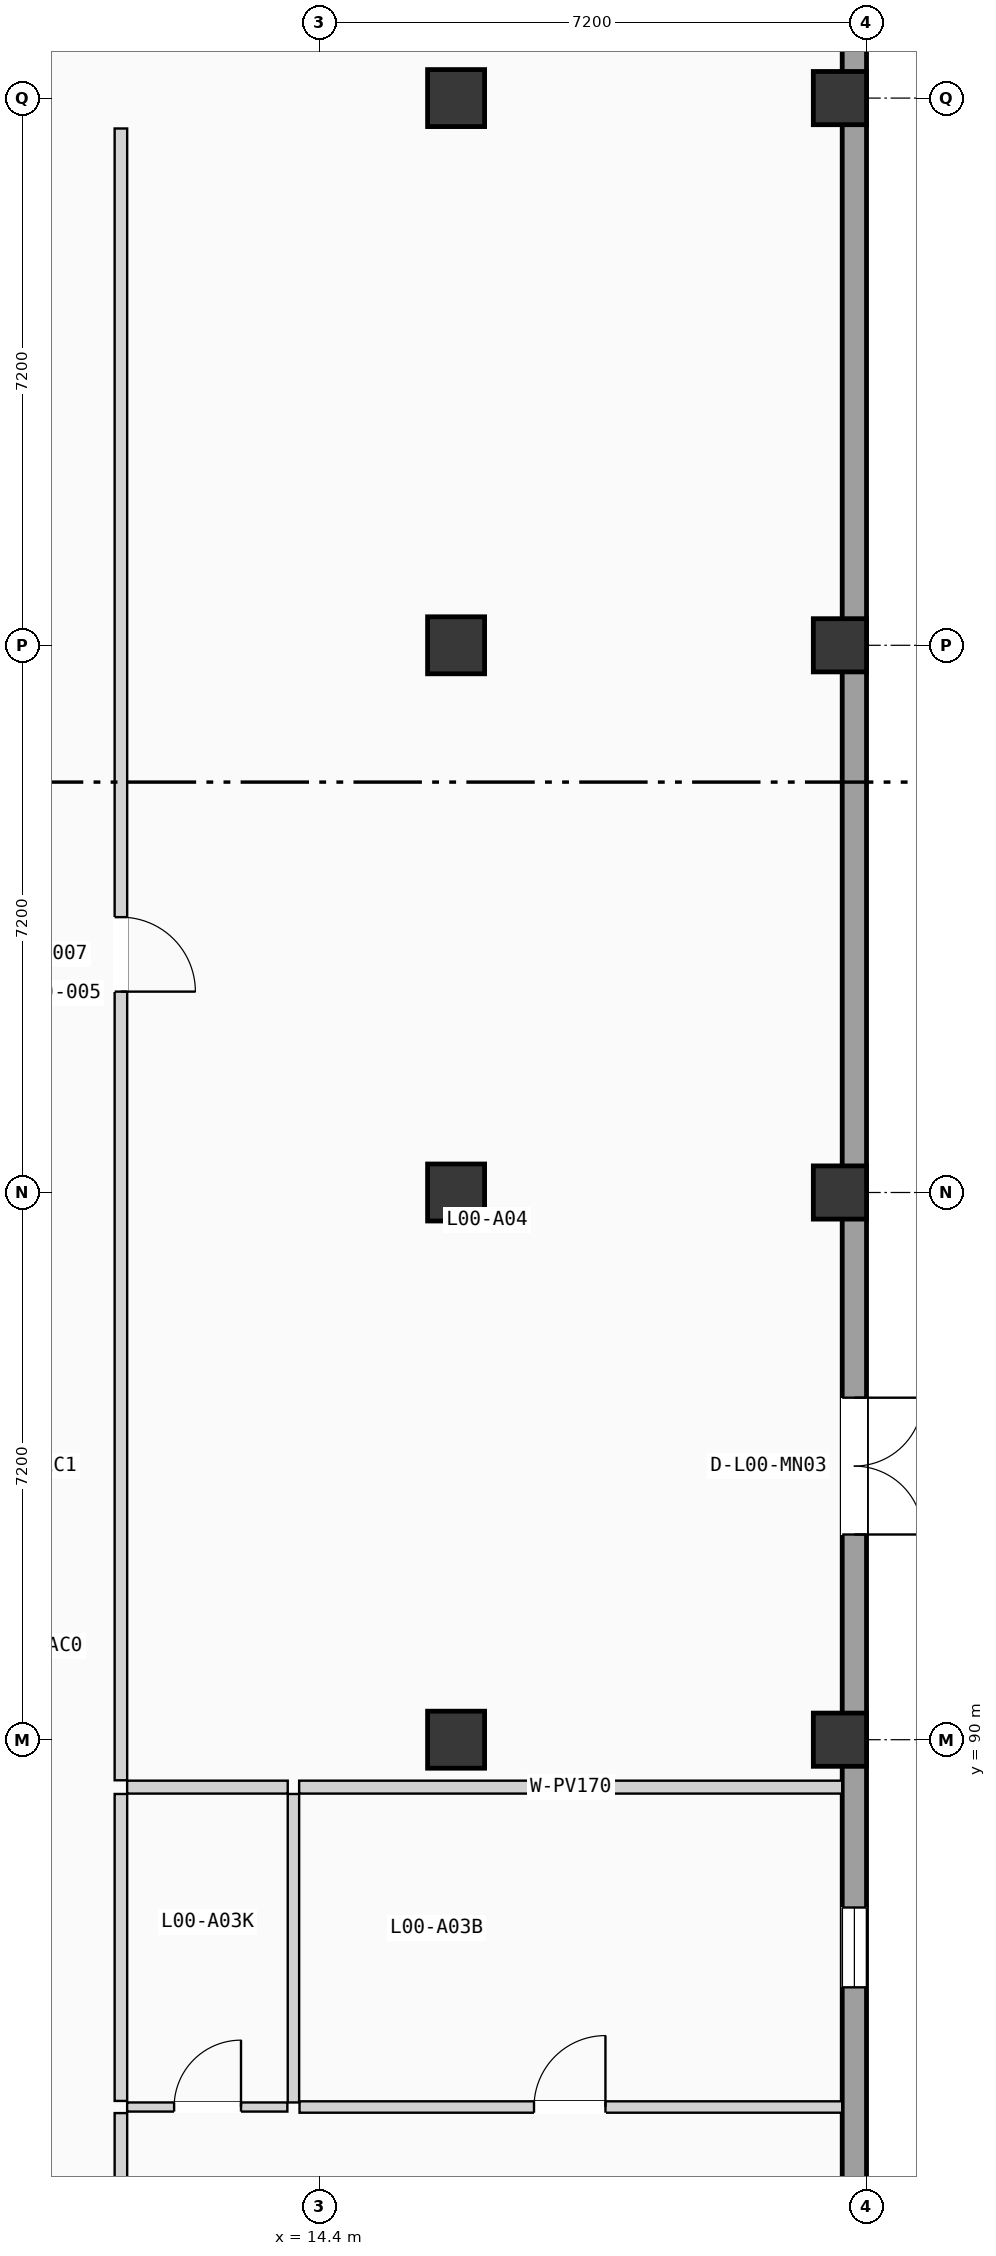
"""IFC4 building model, lengths in metres.
Left out: names, types, materials, properties, quantities, classifications, styles, units other than length and angle.
Written with IfcOpenShell. Run it as: python <this file> out.ifc"""

import sys

from ifc_helpers import new_model, si_unit, direction, frame, frame_2d, origin, origin_2d, place, context, subcontext, project, spatial, rectangle, extrude, element, fill, save


model = new_model("IFC4")
c1 = context("Model", 3, precision=1e-05, world=origin(), true_north=direction((0.0, 1.0)))
c2 = subcontext(c1, "Body", "Model", "MODEL_VIEW")
j1 = project(units=[si_unit("LENGTHUNIT", "METRE"), si_unit("PLANEANGLEUNIT", "RADIAN")], contexts=[c1])
p1 = place(None, origin())
s1 = spatial("IfcSite", under=j1, at=p1, CompositionType="ELEMENT")
p2 = place(p1, origin())
s2 = spatial("IfcBuilding", under=s1, at=p2, CompositionType="ELEMENT")
p3 = place(p2, origin())
s3 = spatial("IfcBuildingStorey", under=s2, at=p3, CompositionType="ELEMENT", Elevation=0.0)
for number, where, z_axis, x_axis in (
    (1, (16.2, 90.0, 0.0), (0.0, 0.0, 1.0), (1.0, 0.0, 0.0)),
    (2, (16.2, 97.2, 0.0), (0.0, 0.0, 1.0), (1.0, 0.0, 0.0)),
    (3, (16.2, 104.4, 0.0), (0.0, 0.0, 1.0), (1.0, 0.0, 0.0)),
    (4, (16.2, 111.6, 0.0), (0.0, 0.0, 1.0), (1.0, 0.0, 0.0)),
):
    element("IfcColumn", number, at=place(p3, frame(where, z_axis=z_axis, x_axis=x_axis)), inside=s3, PredefinedType="COLUMN", context=c2, shape_type="SweptSolid", body=[
        extrude(rectangle(XDim=0.75, YDim=0.75, at=origin_2d()), origin(), (0.0, 0.0, 1.0), 4.9),
    ])
for number, where, z_axis, x_axis in (
    (5, (21.25, 90.0, 0.0), (0.0, 0.0, 1.0), (1.0, 0.0, 0.0)),
    (6, (21.25, 97.2, 0.0), (0.0, 0.0, 1.0), (1.0, 0.0, 0.0)),
    (7, (21.25, 104.4, 0.0), (0.0, 0.0, 1.0), (1.0, 0.0, 0.0)),
    (8, (21.25, 111.6, 0.0), (0.0, 0.0, 1.0), (1.0, 0.0, 0.0)),
):
    element("IfcColumn", number, at=place(p3, frame(where, z_axis=z_axis, x_axis=x_axis)), inside=s3, PredefinedType="COLUMN", context=c2, shape_type="SweptSolid", body=[
        extrude(rectangle(XDim=0.7, YDim=0.7, at=origin_2d()), origin(), (0.0, 0.0, 1.0), 4.9),
    ])
p4 = place(p3, frame((21.44, 68.72, 0.0), z_axis=(0.0, 0.0, 1.0), x_axis=(0.0, 1.0, 0.0)))
e9 = element("IfcWall", 9, at=p4, inside=s3, PredefinedType="SOLIDWALL", context=c2, shape_type="SweptSolid", body=[
    extrude(rectangle(XDim=49.76, YDim=0.32, at=frame_2d((24.88, 0.0))), origin(), (0.0, 0.0, 1.0), 4.64),
])
p5 = place(p4, frame((23.98, 0.0, 0.0)))
e10 = element("IfcOpeningElement", 10, at=p5, cuts=e9, PredefinedType="OPENING", context=c2, shape_type="SweptSolid", body=[
    extrude(rectangle(XDim=1.8, YDim=2.35, at=frame_2d((0.9, 1.175))), frame((0.0, 0.17, 0.0), z_axis=(0.0, -1.0, 0.0), x_axis=(1.0, 0.0, 0.0)), (0.0, 0.0, 1.0), 0.34),
])
p6 = place(p4, frame((12.119, 0.0, 0.9)))
e11 = element("IfcOpeningElement", 11, at=p6, cuts=e9, PredefinedType="OPENING", context=c2, shape_type="SweptSolid", body=[
    extrude(rectangle(XDim=1.05, YDim=1.35, at=frame_2d((0.525, 0.675))), frame((0.0, 0.17, 0.0), z_axis=(0.0, -1.0, 0.0), x_axis=(1.0, 0.0, 0.0)), (0.0, 0.0, 1.0), 0.34),
])
p7 = place(p4, frame((8.774, 0.0, 0.9)))
e12 = element("IfcOpeningElement", 12, at=p7, cuts=e9, PredefinedType="OPENING", context=c2, shape_type="SweptSolid", body=[
    extrude(rectangle(XDim=1.05, YDim=1.5, at=frame_2d((0.525, 0.75))), frame((0.0, 0.17, 0.0), z_axis=(0.0, -1.0, 0.0), x_axis=(1.0, 0.0, 0.0)), (0.0, 0.0, 1.0), 0.34),
])
p8 = place(p4, frame((18.022, 0.0, 0.9)))
e13 = element("IfcOpeningElement", 13, at=p8, cuts=e9, PredefinedType="OPENING", context=c2, shape_type="SweptSolid", body=[
    extrude(rectangle(XDim=1.05, YDim=1.65, at=frame_2d((0.525, 0.825))), frame((0.0, 0.17, 0.0), z_axis=(0.0, -1.0, 0.0), x_axis=(1.0, 0.0, 0.0)), (0.0, 0.0, 1.0), 0.34),
])
p9 = place(p3, frame((11.79, 80.199, 0.0), z_axis=(0.0, 0.0, 1.0), x_axis=(0.0, 1.0, 0.0)))
e14 = element("IfcWall", 14, at=p9, inside=s3, PredefinedType="PARTITIONING", context=c2, shape_type="SweptSolid", body=[
    extrude(rectangle(XDim=4.888, YDim=0.165, at=frame_2d((2.444, 0.0))), origin(), (0.0, 0.0, 1.0), 3.84),
])
p10 = place(p9, frame((1.954, 0.0, 0.0)))
e15 = element("IfcOpeningElement", 15, at=p10, cuts=e14, PredefinedType="OPENING", context=c2, shape_type="SweptSolid", body=[
    extrude(rectangle(XDim=0.98, YDim=2.08, at=frame_2d((0.49, 1.04))), frame((0.0, 0.093, 0.0), z_axis=(0.0, -1.0, 0.0), x_axis=(1.0, 0.0, 0.0)), (0.0, 0.0, 1.0), 0.185),
])
p11 = place(p3, frame((11.79, 85.247, 0.0), z_axis=(0.0, 0.0, 1.0), x_axis=(0.0, 1.0, 0.0)))
e16 = element("IfcWall", 16, at=p11, inside=s3, PredefinedType="PARTITIONING", context=c2, shape_type="SweptSolid", body=[
    extrude(rectangle(XDim=4.039, YDim=0.165, at=frame_2d((2.02, 0.0))), origin(), (0.0, 0.0, 1.0), 3.84),
])
p12 = place(p3, frame((11.79, 89.466, 0.0), z_axis=(0.0, 0.0, 1.0), x_axis=(0.0, 1.0, 0.0)))
e17 = element("IfcWall", 17, at=p12, inside=s3, PredefinedType="PARTITIONING", context=c2, shape_type="SweptSolid", body=[
    extrude(rectangle(XDim=21.734, YDim=0.165, at=frame_2d((10.867, 0.0))), origin(), (0.0, 0.0, 1.0), 3.84),
])
p13 = place(p12, frame((10.377, 0.0, 0.0)))
e18 = element("IfcOpeningElement", 18, at=p13, cuts=e17, PredefinedType="OPENING", context=c2, shape_type="SweptSolid", body=[
    extrude(rectangle(XDim=0.98, YDim=2.08, at=frame_2d((0.49, 1.04))), frame((0.0, 0.093, 0.0), z_axis=(0.0, -1.0, 0.0), x_axis=(1.0, 0.0, 0.0)), (0.0, 0.0, 1.0), 0.185),
])
p14 = place(p3, frame((11.872, 85.167, 0.0), z_axis=(0.0, 0.0, 1.0), x_axis=(1.0, 0.0, 0.0)))
e19 = element("IfcWall", 19, at=p14, inside=s3, PredefinedType="PARTITIONING", context=c2, shape_type="SweptSolid", body=[
    extrude(rectangle(XDim=2.108, YDim=0.12, at=frame_2d((1.054, 0.0))), origin(), (0.0, 0.0, 1.0), 3.84),
])
p15 = place(p14, frame((0.618, 0.0, 0.0)))
e20 = element("IfcOpeningElement", 20, at=p15, cuts=e19, PredefinedType="OPENING", context=c2, shape_type="SweptSolid", body=[
    extrude(rectangle(XDim=0.88, YDim=2.02, at=frame_2d((0.44, 1.01))), frame((0.0, 0.07, 0.0), z_axis=(0.0, -1.0, 0.0), x_axis=(1.0, 0.0, 0.0)), (0.0, 0.0, 1.0), 0.14),
])
p16 = place(p3, frame((14.14, 85.167, 0.0), z_axis=(0.0, 0.0, 1.0), x_axis=(1.0, 0.0, 0.0)))
e21 = element("IfcWall", 21, at=p16, inside=s3, PredefinedType="PARTITIONING", context=c2, shape_type="SweptSolid", body=[
    extrude(rectangle(XDim=7.14, YDim=0.15, at=frame_2d((3.57, 0.0))), origin(), (0.0, 0.0, 1.0), 3.84),
])
p17 = place(p16, frame((3.085, 0.0, 0.0)))
e22 = element("IfcOpeningElement", 22, at=p17, cuts=e21, PredefinedType="OPENING", context=c2, shape_type="SweptSolid", body=[
    extrude(rectangle(XDim=0.94, YDim=2.06, at=frame_2d((0.47, 1.03))), frame((0.0, 0.085, 0.0), z_axis=(0.0, -1.0, 0.0), x_axis=(1.0, 0.0, 0.0)), (0.0, 0.0, 1.0), 0.17),
])
p18 = place(p3, frame((14.06, 85.227, 0.0), z_axis=(0.0, 0.0, 1.0), x_axis=(0.0, 1.0, 0.0)))
e23 = element("IfcWall", 23, at=p18, inside=s3, PredefinedType="PARTITIONING", context=c2, shape_type="SweptSolid", body=[
    extrude(rectangle(XDim=4.059, YDim=0.15, at=frame_2d((2.029, 0.0))), origin(), (0.0, 0.0, 1.0), 3.84),
])
p19 = place(p3, frame((11.872, 89.376, 0.0), z_axis=(0.0, 0.0, 1.0), x_axis=(1.0, 0.0, 0.0)))
e24 = element("IfcWall", 24, at=p19, inside=s3, PredefinedType="PARTITIONING", context=c2, shape_type="SweptSolid", body=[
    extrude(rectangle(XDim=2.113, YDim=0.17, at=frame_2d((1.057, 0.0))), origin(), (0.0, 0.0, 1.0), 3.84),
])
p20 = place(p3, frame((14.135, 89.376, 0.0), z_axis=(0.0, 0.0, 1.0), x_axis=(1.0, 0.0, 0.0)))
e25 = element("IfcWall", 25, at=p20, inside=s3, PredefinedType="PARTITIONING", context=c2, shape_type="SweptSolid", body=[
    extrude(rectangle(XDim=7.145, YDim=0.17, at=frame_2d((3.573, 0.0))), origin(), (0.0, 0.0, 1.0), 3.84),
])
p21 = place(p5, frame((1.8, 0.0, 0.0), z_axis=(0.0, 0.0, 1.0), x_axis=(-1.0, 0.0, 0.0)))
e26 = element("IfcDoor", 26, at=p21, inside=s3, OperationType="DOUBLE_DOOR_SINGLE_SWING", PredefinedType="DOOR", context=c2, shape_type="SweptSolid", body=[
    extrude(rectangle(XDim=1.8, YDim=2.35, at=frame_2d((0.9, 1.175))), frame((0.0, 0.025, 0.0), z_axis=(0.0, -1.0, 0.0), x_axis=(1.0, 0.0, 0.0)), (0.0, 0.0, 1.0), 0.05),
])
fill(e10, e26)
p22 = place(p8, origin())
e27 = element("IfcWindow", 27, at=p22, inside=s3, PartitioningType="SINGLE_PANEL", PredefinedType="WINDOW", context=c2, shape_type="SweptSolid", body=[
    extrude(rectangle(XDim=1.05, YDim=1.65, at=frame_2d((0.525, 0.825))), frame((0.0, 0.03, 0.0), z_axis=(0.0, -1.0, 0.0), x_axis=(1.0, 0.0, 0.0)), (0.0, 0.0, 1.0), 0.06),
])
fill(e13, e27)
p23 = place(p13, frame((0.98, 0.0, 0.0), z_axis=(0.0, 0.0, 1.0), x_axis=(-1.0, 0.0, 0.0)))
e28 = element("IfcDoor", 28, at=p23, inside=s3, OperationType="SINGLE_SWING_LEFT", PredefinedType="DOOR", context=c2, shape_type="SweptSolid", body=[
    extrude(rectangle(XDim=0.98, YDim=2.08, at=frame_2d((0.49, 1.04))), frame((0.0, 0.025, 0.0), z_axis=(0.0, -1.0, 0.0), x_axis=(1.0, 0.0, 0.0)), (0.0, 0.0, 1.0), 0.05),
])
fill(e18, e28)
p24 = place(p15, origin())
e29 = element("IfcDoor", 29, at=p24, inside=s3, OperationType="SINGLE_SWING_RIGHT", PredefinedType="DOOR", context=c2, shape_type="SweptSolid", body=[
    extrude(rectangle(XDim=0.88, YDim=2.02, at=frame_2d((0.44, 1.01))), frame((0.0, 0.025, 0.0), z_axis=(0.0, -1.0, 0.0), x_axis=(1.0, 0.0, 0.0)), (0.0, 0.0, 1.0), 0.05),
])
fill(e20, e29)
p25 = place(p17, origin())
e30 = element("IfcDoor", 30, at=p25, inside=s3, OperationType="SINGLE_SWING_RIGHT", PredefinedType="DOOR", context=c2, shape_type="SweptSolid", body=[
    extrude(rectangle(XDim=0.94, YDim=2.06, at=frame_2d((0.47, 1.03))), frame((0.0, 0.025, 0.0), z_axis=(0.0, -1.0, 0.0), x_axis=(1.0, 0.0, 0.0)), (0.0, 0.0, 1.0), 0.05),
])
fill(e22, e30)
save(model, sys.argv[1])
